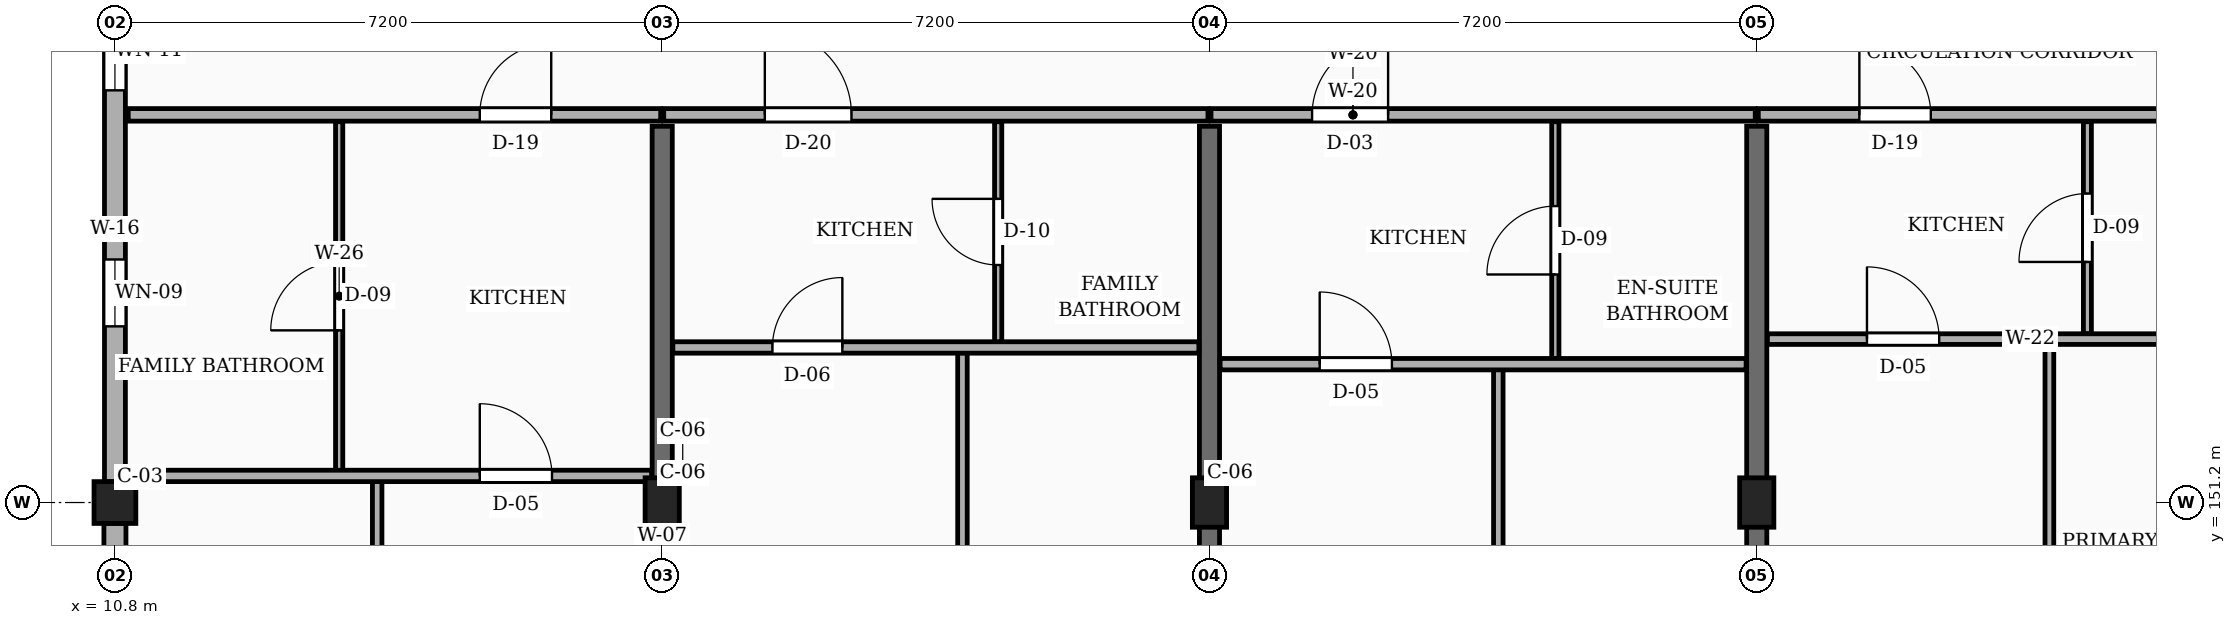
"""IFC4 building model, lengths in metres.
Left out: names, types, materials, properties, quantities, classifications, styles, units other than length and angle.
Written with IfcOpenShell. Run it as: python <this file> out.ifc"""

import sys

from ifc_helpers import new_model, si_unit, direction, frame, frame_2d, origin, origin_2d, place, context, subcontext, project, spatial, rectangle, extrude, element, fill, save


model = new_model("IFC4")
c1 = context("Model", 3, precision=1e-05, world=origin(), true_north=direction((0.0, 1.0)))
c2 = subcontext(c1, "Body", "Model", "MODEL_VIEW")
j1 = project(units=[si_unit("LENGTHUNIT", "METRE"), si_unit("PLANEANGLEUNIT", "RADIAN")], contexts=[c1])
p1 = place(None, origin())
s1 = spatial("IfcSite", under=j1, at=p1, CompositionType="ELEMENT")
p2 = place(p1, origin())
s2 = spatial("IfcBuilding", under=s1, at=p2, CompositionType="ELEMENT")
p3 = place(p2, frame((0.0, 0.0, 10.8)))
s3 = spatial("IfcBuildingStorey", under=s2, at=p3, CompositionType="ELEMENT", Elevation=10.8)
p4 = place(p3, frame((10.8, 151.2, 0.0), z_axis=(0.0, 0.0, 1.0), x_axis=(1.0, 0.0, 0.0)))
e1 = element("IfcColumn", 1, at=p4, inside=s3, PredefinedType="COLUMN", context=c2, shape_type="SweptSolid", body=[
    extrude(rectangle(XDim=0.55, YDim=0.55, at=origin_2d()), origin(), (0.0, 0.0, 1.0), 3.15),
])
for number, where, z_axis, x_axis in (
    (2, (18.0, 151.2, 0.0), (0.0, 0.0, 1.0), (1.0, 0.0, 0.0)),
    (3, (25.2, 151.2, 0.0), (0.0, 0.0, 1.0), (1.0, 0.0, 0.0)),
    (4, (32.4, 151.2, 0.0), (0.0, 0.0, 1.0), (1.0, 0.0, 0.0)),
):
    element("IfcColumn", number, at=place(p3, frame(where, z_axis=z_axis, x_axis=x_axis)), inside=s3, PredefinedType="COLUMN", context=c2, shape_type="SweptSolid", body=[
        extrude(rectangle(XDim=0.45, YDim=0.65, at=origin_2d()), origin(), (0.0, 0.0, 1.0), 3.15),
    ])
for number, where, z_axis, x_axis in (
    (5, (18.0, 144.275, 0.0), (0.0, 0.0, 1.0), (0.0, 1.0, 0.0)),
    (6, (25.2, 144.275, 0.0), (0.0, 0.0, 1.0), (0.0, 1.0, 0.0)),
    (7, (32.4, 144.275, 0.0), (0.0, 0.0, 1.0), (0.0, 1.0, 0.0)),
):
    element("IfcWall", number, at=place(p3, frame(where, z_axis=z_axis, x_axis=x_axis)), inside=s3, PredefinedType="SOLIDWALL", context=c2, shape_type="SweptSolid", body=[
        extrude(rectangle(XDim=11.875, YDim=0.265, at=frame_2d((5.938, 0.0))), origin(), (0.0, 0.0, 1.0), 2.185),
    ])
p5 = place(p3, frame((10.8, 158.125, 0.0), z_axis=(0.0, 0.0, 1.0), x_axis=(0.0, -1.0, 0.0)))
e8 = element("IfcWall", 8, at=p5, inside=s3, PredefinedType="SOLIDWALL", context=c2, shape_type="SweptSolid", body=[
    extrude(rectangle(XDim=6.65, YDim=0.275, at=frame_2d((3.325, 0.0))), origin(), (0.0, 0.0, 1.0), 2.455),
])
p6 = place(p5, frame((0.462, 0.0, 0.78)))
e9 = element("IfcOpeningElement", 9, at=p6, cuts=e8, PredefinedType="OPENING", context=c2, shape_type="SweptSolid", body=[
    extrude(rectangle(XDim=1.04, YDim=1.26, at=frame_2d((0.52, 0.63))), frame((0.0, 0.147, 0.0), z_axis=(0.0, -1.0, 0.0), x_axis=(1.0, 0.0, 0.0)), (0.0, 0.0, 1.0), 0.295),
])
p7 = place(p5, frame((3.728, 0.0, 0.78)))
e10 = element("IfcOpeningElement", 10, at=p7, cuts=e8, PredefinedType="OPENING", context=c2, shape_type="SweptSolid", body=[
    extrude(rectangle(XDim=0.88, YDim=1.26, at=frame_2d((0.44, 0.63))), frame((0.0, 0.147, 0.0), z_axis=(0.0, -1.0, 0.0), x_axis=(1.0, 0.0, 0.0)), (0.0, 0.0, 1.0), 0.295),
])
p8 = place(p3, frame((10.8, 150.925, 0.0), z_axis=(0.0, 0.0, 1.0), x_axis=(0.0, -1.0, 0.0)))
e11 = element("IfcWall", 11, at=p8, inside=s3, PredefinedType="SOLIDWALL", context=c2, shape_type="SweptSolid", body=[
    extrude(rectangle(XDim=6.65, YDim=0.29, at=frame_2d((3.325, 0.0))), origin(), (0.0, 0.0, 1.0), 2.455),
])
p9 = place(p8, frame((0.45, 0.0, 0.78)))
e12 = element("IfcOpeningElement", 12, at=p9, cuts=e11, PredefinedType="OPENING", context=c2, shape_type="SweptSolid", body=[
    extrude(rectangle(XDim=0.88, YDim=1.26, at=frame_2d((0.44, 0.63))), frame((0.0, 0.155, 0.0), z_axis=(0.0, -1.0, 0.0), x_axis=(1.0, 0.0, 0.0)), (0.0, 0.0, 1.0), 0.31),
])
p10 = place(p8, frame((4.65, 0.0, 0.78)))
e13 = element("IfcOpeningElement", 13, at=p10, cuts=e11, PredefinedType="OPENING", context=c2, shape_type="SweptSolid", body=[
    extrude(rectangle(XDim=1.04, YDim=1.26, at=frame_2d((0.52, 0.63))), frame((0.0, 0.155, 0.0), z_axis=(0.0, -1.0, 0.0), x_axis=(1.0, 0.0, 0.0)), (0.0, 0.0, 1.0), 0.31),
])
p11 = place(p3, frame((10.975, 156.3, 0.0), z_axis=(0.0, 0.0, 1.0), x_axis=(1.0, 0.0, 0.0)))
e14 = element("IfcWall", 14, at=p11, inside=s3, PredefinedType="PARTITIONING", context=c2, shape_type="SweptSolid", body=[
    extrude(rectangle(XDim=7.005, YDim=0.165, at=frame_2d((3.502, 0.0))), origin(), (0.0, 0.0, 1.0), 2.32),
])
p12 = place(p11, frame((4.625, 0.0, 0.0)))
e15 = element("IfcOpeningElement", 15, at=p12, cuts=e14, PredefinedType="OPENING", context=c2, shape_type="SweptSolid", body=[
    extrude(rectangle(XDim=0.94, YDim=2.12, at=frame_2d((0.47, 1.06))), frame((0.0, 0.093, 0.0), z_axis=(0.0, -1.0, 0.0), x_axis=(1.0, 0.0, 0.0)), (0.0, 0.0, 1.0), 0.185),
])
p13 = place(p3, frame((18.02, 156.3, 0.0), z_axis=(0.0, 0.0, 1.0), x_axis=(1.0, 0.0, 0.0)))
e16 = element("IfcWall", 16, at=p13, inside=s3, PredefinedType="PARTITIONING", context=c2, shape_type="SweptSolid", body=[
    extrude(rectangle(XDim=7.16, YDim=0.165, at=frame_2d((3.58, 0.0))), origin(), (0.0, 0.0, 1.0), 2.32),
])
p14 = place(p13, frame((1.33, 0.0, 0.0)))
e17 = element("IfcOpeningElement", 17, at=p14, cuts=e16, PredefinedType="OPENING", context=c2, shape_type="SweptSolid", body=[
    extrude(rectangle(XDim=1.14, YDim=2.18, at=frame_2d((0.57, 1.09))), frame((0.0, 0.093, 0.0), z_axis=(0.0, -1.0, 0.0), x_axis=(1.0, 0.0, 0.0)), (0.0, 0.0, 1.0), 0.185),
])
p15 = place(p3, frame((25.22, 156.3, 0.0), z_axis=(0.0, 0.0, 1.0), x_axis=(1.0, 0.0, 0.0)))
e18 = element("IfcWall", 18, at=p15, inside=s3, PredefinedType="PARTITIONING", context=c2, shape_type="SweptSolid", body=[
    extrude(rectangle(XDim=7.16, YDim=0.165, at=frame_2d((3.58, 0.0))), origin(), (0.0, 0.0, 1.0), 2.32),
])
p16 = place(p15, frame((1.33, 0.0, 0.0)))
e19 = element("IfcOpeningElement", 19, at=p16, cuts=e18, PredefinedType="OPENING", context=c2, shape_type="SweptSolid", body=[
    extrude(rectangle(XDim=1.0, YDim=2.15, at=frame_2d((0.5, 1.075))), frame((0.0, 0.093, 0.0), z_axis=(0.0, -1.0, 0.0), x_axis=(1.0, 0.0, 0.0)), (0.0, 0.0, 1.0), 0.185),
])
p17 = place(p3, frame((32.42, 156.3, 0.0), z_axis=(0.0, 0.0, 1.0), x_axis=(1.0, 0.0, 0.0)))
e20 = element("IfcWall", 20, at=p17, inside=s3, PredefinedType="PARTITIONING", context=c2, shape_type="SweptSolid", body=[
    extrude(rectangle(XDim=7.16, YDim=0.165, at=frame_2d((3.58, 0.0))), origin(), (0.0, 0.0, 1.0), 2.32),
])
p18 = place(p17, frame((1.33, 0.0, 0.0)))
e21 = element("IfcOpeningElement", 21, at=p18, cuts=e20, PredefinedType="OPENING", context=c2, shape_type="SweptSolid", body=[
    extrude(rectangle(XDim=0.94, YDim=2.12, at=frame_2d((0.47, 1.06))), frame((0.0, 0.093, 0.0), z_axis=(0.0, -1.0, 0.0), x_axis=(1.0, 0.0, 0.0)), (0.0, 0.0, 1.0), 0.185),
])
p19 = place(p3, frame((14.25, 144.175, 0.0), z_axis=(0.0, 0.0, 1.0), x_axis=(0.0, 1.0, 0.0)))
e22 = element("IfcWall", 22, at=p19, inside=s3, PredefinedType="PARTITIONING", context=c2, shape_type="SweptSolid", body=[
    extrude(rectangle(XDim=7.305, YDim=0.125, at=frame_2d((3.652, 0.0))), origin(), (0.0, 0.0, 1.0), 2.32),
])
p20 = place(p19, frame((3.202, 0.0, 0.0)))
e23 = element("IfcOpeningElement", 23, at=p20, cuts=e22, PredefinedType="OPENING", context=c2, shape_type="SweptSolid", body=[
    extrude(rectangle(XDim=0.9, YDim=2.1, at=frame_2d((0.45, 1.05))), frame((0.0, 0.073, 0.0), z_axis=(0.0, -1.0, 0.0), x_axis=(1.0, 0.0, 0.0)), (0.0, 0.0, 1.0), 0.145),
])
p21 = place(p3, frame((13.75, 151.62, 0.0), z_axis=(0.0, 0.0, 1.0), x_axis=(0.0, 1.0, 0.0)))
e24 = element("IfcWall", 24, at=p21, inside=s3, PredefinedType="PARTITIONING", context=c2, shape_type="SweptSolid", body=[
    extrude(rectangle(XDim=4.59, YDim=0.095, at=frame_2d((2.295, 0.0))), origin(), (0.0, 0.0, 1.0), 2.32),
])
p22 = place(p21, frame((1.845, 0.0, 0.0)))
e25 = element("IfcOpeningElement", 25, at=p22, cuts=e24, PredefinedType="OPENING", context=c2, shape_type="SweptSolid", body=[
    extrude(rectangle(XDim=0.9, YDim=2.05, at=frame_2d((0.45, 1.025))), frame((0.0, 0.058, 0.0), z_axis=(0.0, -1.0, 0.0), x_axis=(1.0, 0.0, 0.0)), (0.0, 0.0, 1.0), 0.115),
])
p23 = place(p3, frame((10.975, 151.55, 0.0), z_axis=(0.0, 0.0, 1.0), x_axis=(1.0, 0.0, 0.0)))
e26 = element("IfcWall", 26, at=p23, inside=s3, PredefinedType="PARTITIONING", context=c2, shape_type="SweptSolid", body=[
    extrude(rectangle(XDim=6.885, YDim=0.15, at=frame_2d((3.442, 0.0))), origin(), (0.0, 0.0, 1.0), 2.32),
])
p24 = place(p23, frame((4.625, 0.0, 0.0)))
e27 = element("IfcOpeningElement", 27, at=p24, cuts=e26, PredefinedType="OPENING", context=c2, shape_type="SweptSolid", body=[
    extrude(rectangle(XDim=0.95, YDim=2.1, at=frame_2d((0.475, 1.05))), frame((0.0, 0.085, 0.0), z_axis=(0.0, -1.0, 0.0), x_axis=(1.0, 0.0, 0.0)), (0.0, 0.0, 1.0), 0.17),
])
p25 = place(p3, frame((21.95, 144.175, 0.0), z_axis=(0.0, 0.0, 1.0), x_axis=(0.0, 1.0, 0.0)))
e28 = element("IfcWall", 28, at=p25, inside=s3, PredefinedType="PARTITIONING", context=c2, shape_type="SweptSolid", body=[
    extrude(rectangle(XDim=8.995, YDim=0.125, at=frame_2d((4.498, 0.0))), origin(), (0.0, 0.0, 1.0), 2.32),
])
p26 = place(p25, frame((4.058, 0.0, 0.0)))
e29 = element("IfcOpeningElement", 29, at=p26, cuts=e28, PredefinedType="OPENING", context=c2, shape_type="SweptSolid", body=[
    extrude(rectangle(XDim=0.88, YDim=2.08, at=frame_2d((0.44, 1.04))), frame((0.0, 0.073, 0.0), z_axis=(0.0, -1.0, 0.0), x_axis=(1.0, 0.0, 0.0)), (0.0, 0.0, 1.0), 0.145),
])
p27 = place(p3, frame((22.42, 153.31, 0.0), z_axis=(0.0, 0.0, 1.0), x_axis=(0.0, 1.0, 0.0)))
e30 = element("IfcWall", 30, at=p27, inside=s3, PredefinedType="PARTITIONING", context=c2, shape_type="SweptSolid", body=[
    extrude(rectangle(XDim=2.9, YDim=0.095, at=frame_2d((1.45, 0.0))), origin(), (0.0, 0.0, 1.0), 2.32),
])
p28 = place(p27, frame((1.015, 0.0, 0.0)))
e31 = element("IfcOpeningElement", 31, at=p28, cuts=e30, PredefinedType="OPENING", context=c2, shape_type="SweptSolid", body=[
    extrude(rectangle(XDim=0.87, YDim=2.05, at=frame_2d((0.435, 1.025))), frame((0.0, 0.058, 0.0), z_axis=(0.0, -1.0, 0.0), x_axis=(1.0, 0.0, 0.0)), (0.0, 0.0, 1.0), 0.115),
])
p29 = place(p3, frame((18.14, 153.24, 0.0), z_axis=(0.0, 0.0, 1.0), x_axis=(1.0, 0.0, 0.0)))
e32 = element("IfcWall", 32, at=p29, inside=s3, PredefinedType="PARTITIONING", context=c2, shape_type="SweptSolid", body=[
    extrude(rectangle(XDim=6.92, YDim=0.15, at=frame_2d((3.46, 0.0))), origin(), (0.0, 0.0, 1.0), 2.32),
])
p30 = place(p29, frame((1.31, 0.0, 0.0)))
e33 = element("IfcOpeningElement", 33, at=p30, cuts=e32, PredefinedType="OPENING", context=c2, shape_type="SweptSolid", body=[
    extrude(rectangle(XDim=0.92, YDim=2.1, at=frame_2d((0.46, 1.05))), frame((0.0, 0.085, 0.0), z_axis=(0.0, -1.0, 0.0), x_axis=(1.0, 0.0, 0.0)), (0.0, 0.0, 1.0), 0.17),
])
p31 = place(p3, frame((29.0, 144.175, 0.0), z_axis=(0.0, 0.0, 1.0), x_axis=(0.0, 1.0, 0.0)))
e34 = element("IfcWall", 34, at=p31, inside=s3, PredefinedType="PARTITIONING", context=c2, shape_type="SweptSolid", body=[
    extrude(rectangle(XDim=8.775, YDim=0.125, at=frame_2d((4.387, 0.0))), origin(), (0.0, 0.0, 1.0), 2.32),
])
p32 = place(p31, frame((3.938, 0.0, 0.0)))
e35 = element("IfcOpeningElement", 35, at=p32, cuts=e34, PredefinedType="OPENING", context=c2, shape_type="SweptSolid", body=[
    extrude(rectangle(XDim=0.9, YDim=2.1, at=frame_2d((0.45, 1.05))), frame((0.0, 0.073, 0.0), z_axis=(0.0, -1.0, 0.0), x_axis=(1.0, 0.0, 0.0)), (0.0, 0.0, 1.0), 0.145),
])
p33 = place(p3, frame((29.75, 153.09, 0.0), z_axis=(0.0, 0.0, 1.0), x_axis=(0.0, 1.0, 0.0)))
e36 = element("IfcWall", 36, at=p33, inside=s3, PredefinedType="PARTITIONING", context=c2, shape_type="SweptSolid", body=[
    extrude(rectangle(XDim=3.12, YDim=0.095, at=frame_2d((1.56, 0.0))), origin(), (0.0, 0.0, 1.0), 2.32),
])
p34 = place(p33, frame((1.11, 0.0, 0.0)))
e37 = element("IfcOpeningElement", 37, at=p34, cuts=e36, PredefinedType="OPENING", context=c2, shape_type="SweptSolid", body=[
    extrude(rectangle(XDim=0.9, YDim=2.05, at=frame_2d((0.45, 1.025))), frame((0.0, 0.058, 0.0), z_axis=(0.0, -1.0, 0.0), x_axis=(1.0, 0.0, 0.0)), (0.0, 0.0, 1.0), 0.115),
])
p35 = place(p3, frame((25.34, 153.02, 0.0), z_axis=(0.0, 0.0, 1.0), x_axis=(1.0, 0.0, 0.0)))
e38 = element("IfcWall", 38, at=p35, inside=s3, PredefinedType="PARTITIONING", context=c2, shape_type="SweptSolid", body=[
    extrude(rectangle(XDim=6.92, YDim=0.15, at=frame_2d((3.46, 0.0))), origin(), (0.0, 0.0, 1.0), 2.32),
])
p36 = place(p35, frame((1.31, 0.0, 0.0)))
e39 = element("IfcOpeningElement", 39, at=p36, cuts=e38, PredefinedType="OPENING", context=c2, shape_type="SweptSolid", body=[
    extrude(rectangle(XDim=0.95, YDim=2.1, at=frame_2d((0.475, 1.05))), frame((0.0, 0.085, 0.0), z_axis=(0.0, -1.0, 0.0), x_axis=(1.0, 0.0, 0.0)), (0.0, 0.0, 1.0), 0.17),
])
p37 = place(p3, frame((36.25, 144.175, 0.0), z_axis=(0.0, 0.0, 1.0), x_axis=(0.0, 1.0, 0.0)))
e40 = element("IfcWall", 40, at=p37, inside=s3, PredefinedType="PARTITIONING", context=c2, shape_type="SweptSolid", body=[
    extrude(rectangle(XDim=9.105, YDim=0.115, at=frame_2d((4.552, 0.0))), origin(), (0.0, 0.0, 1.0), 2.32),
])
p38 = place(p37, frame((4.103, 0.0, 0.0)))
e41 = element("IfcOpeningElement", 41, at=p38, cuts=e40, PredefinedType="OPENING", context=c2, shape_type="SweptSolid", body=[
    extrude(rectangle(XDim=0.9, YDim=2.1, at=frame_2d((0.45, 1.05))), frame((0.0, 0.067, 0.0), z_axis=(0.0, -1.0, 0.0), x_axis=(1.0, 0.0, 0.0)), (0.0, 0.0, 1.0), 0.135),
])
p39 = place(p3, frame((36.75, 153.42, 0.0), z_axis=(0.0, 0.0, 1.0), x_axis=(0.0, 1.0, 0.0)))
e42 = element("IfcWall", 42, at=p39, inside=s3, PredefinedType="PARTITIONING", context=c2, shape_type="SweptSolid", body=[
    extrude(rectangle(XDim=2.79, YDim=0.105, at=frame_2d((1.395, 0.0))), origin(), (0.0, 0.0, 1.0), 2.32),
])
p40 = place(p39, frame((0.945, 0.0, 0.0)))
e43 = element("IfcOpeningElement", 43, at=p40, cuts=e42, PredefinedType="OPENING", context=c2, shape_type="SweptSolid", body=[
    extrude(rectangle(XDim=0.9, YDim=2.05, at=frame_2d((0.45, 1.025))), frame((0.0, 0.062, 0.0), z_axis=(0.0, -1.0, 0.0), x_axis=(1.0, 0.0, 0.0)), (0.0, 0.0, 1.0), 0.125),
])
p41 = place(p3, frame((32.54, 153.35, 0.0), z_axis=(0.0, 0.0, 1.0), x_axis=(1.0, 0.0, 0.0)))
e44 = element("IfcWall", 44, at=p41, inside=s3, PredefinedType="PARTITIONING", context=c2, shape_type="SweptSolid", body=[
    extrude(rectangle(XDim=6.92, YDim=0.14, at=frame_2d((3.46, 0.0))), origin(), (0.0, 0.0, 1.0), 2.32),
])
p42 = place(p41, frame((1.31, 0.0, 0.0)))
e45 = element("IfcOpeningElement", 45, at=p42, cuts=e44, PredefinedType="OPENING", context=c2, shape_type="SweptSolid", body=[
    extrude(rectangle(XDim=0.95, YDim=2.1, at=frame_2d((0.475, 1.05))), frame((0.0, 0.08, 0.0), z_axis=(0.0, -1.0, 0.0), x_axis=(1.0, 0.0, 0.0)), (0.0, 0.0, 1.0), 0.16),
])
p43 = place(p6, origin())
e46 = element("IfcWindow", 46, at=p43, inside=s3, PartitioningType="SINGLE_PANEL", PredefinedType="WINDOW", context=c2, shape_type="SweptSolid", body=[
    extrude(rectangle(XDim=1.04, YDim=1.26, at=frame_2d((0.52, 0.63))), frame((0.0, 0.03, 0.0), z_axis=(0.0, -1.0, 0.0), x_axis=(1.0, 0.0, 0.0)), (0.0, 0.0, 1.0), 0.06),
])
fill(e9, e46)
p44 = place(p7, origin())
e47 = element("IfcWindow", 47, at=p44, inside=s3, PartitioningType="SINGLE_PANEL", PredefinedType="WINDOW", context=c2, shape_type="SweptSolid", body=[
    extrude(rectangle(XDim=0.88, YDim=1.26, at=frame_2d((0.44, 0.63))), frame((0.0, 0.03, 0.0), z_axis=(0.0, -1.0, 0.0), x_axis=(1.0, 0.0, 0.0)), (0.0, 0.0, 1.0), 0.06),
])
fill(e10, e47)
p45 = place(p12, origin())
e48 = element("IfcDoor", 48, at=p45, inside=s3, OperationType="SINGLE_SWING_RIGHT", PredefinedType="DOOR", context=c2, shape_type="SweptSolid", body=[
    extrude(rectangle(XDim=0.94, YDim=2.12, at=frame_2d((0.47, 1.06))), frame((0.0, 0.025, 0.0), z_axis=(0.0, -1.0, 0.0), x_axis=(1.0, 0.0, 0.0)), (0.0, 0.0, 1.0), 0.05),
])
fill(e15, e48)
p46 = place(p14, origin())
e49 = element("IfcDoor", 49, at=p46, inside=s3, OperationType="SINGLE_SWING_LEFT", PredefinedType="DOOR", context=c2, shape_type="SweptSolid", body=[
    extrude(rectangle(XDim=1.14, YDim=2.18, at=frame_2d((0.57, 1.09))), frame((0.0, 0.025, 0.0), z_axis=(0.0, -1.0, 0.0), x_axis=(1.0, 0.0, 0.0)), (0.0, 0.0, 1.0), 0.05),
])
fill(e17, e49)
p47 = place(p16, origin())
e50 = element("IfcDoor", 50, at=p47, inside=s3, OperationType="SINGLE_SWING_RIGHT", PredefinedType="DOOR", context=c2, shape_type="SweptSolid", body=[
    extrude(rectangle(XDim=1.0, YDim=2.15, at=frame_2d((0.5, 1.075))), frame((0.0, 0.025, 0.0), z_axis=(0.0, -1.0, 0.0), x_axis=(1.0, 0.0, 0.0)), (0.0, 0.0, 1.0), 0.05),
])
fill(e19, e50)
p48 = place(p18, origin())
e51 = element("IfcDoor", 51, at=p48, inside=s3, OperationType="SINGLE_SWING_LEFT", PredefinedType="DOOR", context=c2, shape_type="SweptSolid", body=[
    extrude(rectangle(XDim=0.94, YDim=2.12, at=frame_2d((0.47, 1.06))), frame((0.0, 0.025, 0.0), z_axis=(0.0, -1.0, 0.0), x_axis=(1.0, 0.0, 0.0)), (0.0, 0.0, 1.0), 0.05),
])
fill(e21, e51)
p49 = place(p22, origin())
e52 = element("IfcDoor", 52, at=p49, inside=s3, OperationType="SINGLE_SWING_LEFT", PredefinedType="DOOR", context=c2, shape_type="SweptSolid", body=[
    extrude(rectangle(XDim=0.9, YDim=2.05, at=frame_2d((0.45, 1.025))), frame((0.0, 0.025, 0.0), z_axis=(0.0, -1.0, 0.0), x_axis=(1.0, 0.0, 0.0)), (0.0, 0.0, 1.0), 0.05),
])
fill(e25, e52)
p50 = place(p24, origin())
e53 = element("IfcDoor", 53, at=p50, inside=s3, OperationType="SINGLE_SWING_LEFT", PredefinedType="DOOR", context=c2, shape_type="SweptSolid", body=[
    extrude(rectangle(XDim=0.95, YDim=2.1, at=frame_2d((0.475, 1.05))), frame((0.0, 0.025, 0.0), z_axis=(0.0, -1.0, 0.0), x_axis=(1.0, 0.0, 0.0)), (0.0, 0.0, 1.0), 0.05),
])
fill(e27, e53)
p51 = place(p28, origin())
e54 = element("IfcDoor", 54, at=p51, inside=s3, OperationType="SINGLE_SWING_RIGHT", PredefinedType="DOOR", context=c2, shape_type="SweptSolid", body=[
    extrude(rectangle(XDim=0.87, YDim=2.05, at=frame_2d((0.435, 1.025))), frame((0.0, 0.025, 0.0), z_axis=(0.0, -1.0, 0.0), x_axis=(1.0, 0.0, 0.0)), (0.0, 0.0, 1.0), 0.05),
])
fill(e31, e54)
p52 = place(p30, origin())
e55 = element("IfcDoor", 55, at=p52, inside=s3, OperationType="SINGLE_SWING_RIGHT", PredefinedType="DOOR", context=c2, shape_type="SweptSolid", body=[
    extrude(rectangle(XDim=0.92, YDim=2.1, at=frame_2d((0.46, 1.05))), frame((0.0, 0.025, 0.0), z_axis=(0.0, -1.0, 0.0), x_axis=(1.0, 0.0, 0.0)), (0.0, 0.0, 1.0), 0.05),
])
fill(e33, e55)
p53 = place(p34, origin())
e56 = element("IfcDoor", 56, at=p53, inside=s3, OperationType="SINGLE_SWING_LEFT", PredefinedType="DOOR", context=c2, shape_type="SweptSolid", body=[
    extrude(rectangle(XDim=0.9, YDim=2.05, at=frame_2d((0.45, 1.025))), frame((0.0, 0.025, 0.0), z_axis=(0.0, -1.0, 0.0), x_axis=(1.0, 0.0, 0.0)), (0.0, 0.0, 1.0), 0.05),
])
fill(e37, e56)
p54 = place(p36, origin())
e57 = element("IfcDoor", 57, at=p54, inside=s3, OperationType="SINGLE_SWING_LEFT", PredefinedType="DOOR", context=c2, shape_type="SweptSolid", body=[
    extrude(rectangle(XDim=0.95, YDim=2.1, at=frame_2d((0.475, 1.05))), frame((0.0, 0.025, 0.0), z_axis=(0.0, -1.0, 0.0), x_axis=(1.0, 0.0, 0.0)), (0.0, 0.0, 1.0), 0.05),
])
fill(e39, e57)
p55 = place(p40, origin())
e58 = element("IfcDoor", 58, at=p55, inside=s3, OperationType="SINGLE_SWING_LEFT", PredefinedType="DOOR", context=c2, shape_type="SweptSolid", body=[
    extrude(rectangle(XDim=0.9, YDim=2.05, at=frame_2d((0.45, 1.025))), frame((0.0, 0.025, 0.0), z_axis=(0.0, -1.0, 0.0), x_axis=(1.0, 0.0, 0.0)), (0.0, 0.0, 1.0), 0.05),
])
fill(e43, e58)
p56 = place(p42, origin())
e59 = element("IfcDoor", 59, at=p56, inside=s3, OperationType="SINGLE_SWING_LEFT", PredefinedType="DOOR", context=c2, shape_type="SweptSolid", body=[
    extrude(rectangle(XDim=0.95, YDim=2.1, at=frame_2d((0.475, 1.05))), frame((0.0, 0.025, 0.0), z_axis=(0.0, -1.0, 0.0), x_axis=(1.0, 0.0, 0.0)), (0.0, 0.0, 1.0), 0.05),
])
fill(e45, e59)
save(model, sys.argv[1])
